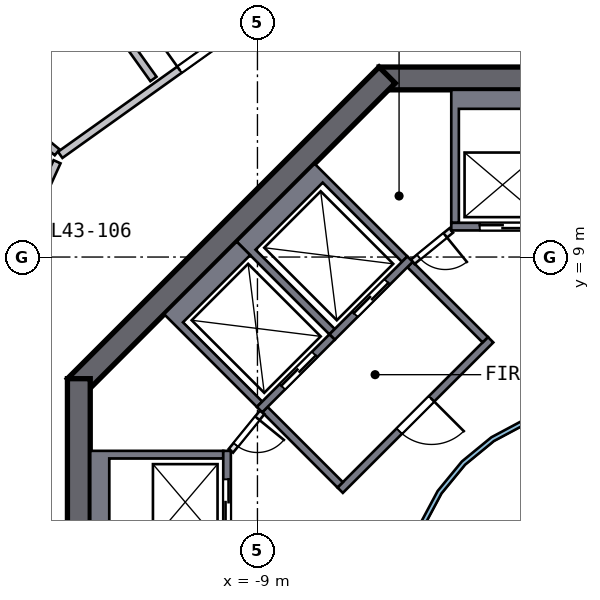
"""IFC4 building model, lengths in metres.
Left out: names, types, materials, properties, quantities, classifications, styles, units other than length and angle.
Written with IfcOpenShell. Run it as: python <this file> out.ifc"""

import sys

from ifc_helpers import new_model, si_unit, direction, frame, frame_2d, origin, place, context, subcontext, project, spatial, polyline, rectangle, outline, extrude, element, fill, save


model = new_model("IFC4")
c1 = context("Model", 3, precision=1e-05, world=origin(), true_north=direction((0.0, 1.0)))
c2 = subcontext(c1, "Body", "Model", "MODEL_VIEW")
j1 = project(units=[si_unit("LENGTHUNIT", "METRE"), si_unit("PLANEANGLEUNIT", "RADIAN")], contexts=[c1])
p1 = place(None, origin())
s1 = spatial("IfcSite", under=j1, at=p1, CompositionType="ELEMENT")
p2 = place(p1, origin())
s2 = spatial("IfcBuilding", under=s1, at=p2, CompositionType="ELEMENT")
p3 = place(p2, frame((0.0, 0.0, 180.0)))
s3 = spatial("IfcBuildingStorey", under=s2, at=p3, CompositionType="ELEMENT", Elevation=180.0)
p4 = place(p3, frame((5.799, 13.7, 0.0), z_axis=(0.0, 0.0, 1.0), x_axis=(-1.0, 0.0, 0.0)))
e1 = element("IfcWall", 1, at=p4, inside=s3, PredefinedType="SHEAR", context=c2, shape_type="SweptSolid", body=[
    extrude(rectangle(XDim=11.598, YDim=0.6, at=frame_2d((5.799, 0.0))), origin(), (0.0, 0.0, 1.0), 3.5),
])
p5 = place(p4, frame((4.899, 0.0, 0.0)))
e2 = element("IfcOpeningElement", 2, at=p5, cuts=e1, PredefinedType="OPENING", context=c2, shape_type="SweptSolid", body=[
    extrude(rectangle(XDim=1.8, YDim=2.1, at=frame_2d((0.9, 1.05))), frame((0.0, 0.31, 0.0), z_axis=(0.0, -1.0, 0.0), x_axis=(1.0, 0.0, 0.0)), (0.0, 0.0, 1.0), 0.62),
])
p6 = place(p3, frame((-5.587, 13.788, 0.0), z_axis=(0.0, 0.0, 1.0), x_axis=(-0.707106781, -0.707106781, 0.0)))
e3 = element("IfcWall", 3, at=p6, inside=s3, PredefinedType="SHEAR", context=c2, shape_type="SweptSolid", body=[
    extrude(rectangle(XDim=11.598, YDim=0.6, at=frame_2d((5.799, 0.0))), origin(), (0.0, 0.0, 1.0), 3.5),
])
p7 = place(p3, frame((-13.7, 5.799, 0.0), z_axis=(0.0, 0.0, 1.0), x_axis=(0.0, -1.0, 0.0)))
e4 = element("IfcWall", 4, at=p7, inside=s3, PredefinedType="SHEAR", context=c2, shape_type="SweptSolid", body=[
    extrude(rectangle(XDim=11.598, YDim=0.6, at=frame_2d((5.799, 0.0))), origin(), (0.0, 0.0, 1.0), 3.5),
])
p8 = place(p7, frame((4.899, 0.0, 0.0)))
e5 = element("IfcOpeningElement", 5, at=p8, cuts=e4, PredefinedType="OPENING", context=c2, shape_type="SweptSolid", body=[
    extrude(rectangle(XDim=1.8, YDim=2.1, at=frame_2d((0.9, 1.05))), frame((0.0, 0.31, 0.0), z_axis=(0.0, -1.0, 0.0), x_axis=(1.0, 0.0, 0.0)), (0.0, 0.0, 1.0), 0.62),
])
p9 = place(p3, origin())
e6 = element("IfcWall", 6, at=p9, inside=s3, PredefinedType="SOLIDWALL", context=c2, shape_type="SweptSolid", body=[
    extrude(outline(polyline([(-3.9, 13.4), (-1.2, 13.4), (-1.2, 9.9), (-1.4, 9.9), (-1.4, 12.9), (-3.7, 12.9), (-3.7, 9.9), (-3.9, 9.9), (-3.9, 13.4)])), origin(), (0.0, 0.0, 1.0), 3.19),
])
p10 = place(p3, frame((-1.2, 9.8, 0.0), z_axis=(0.0, 0.0, 1.0), x_axis=(-1.0, 0.0, 0.0)))
e7 = element("IfcWall", 7, at=p10, inside=s3, PredefinedType="SOLIDWALL", context=c2, shape_type="SweptSolid", body=[
    extrude(rectangle(XDim=2.7, YDim=0.2, at=frame_2d((1.35, 0.0))), origin(), (0.0, 0.0, 1.0), 3.19),
])
p11 = place(p10, frame((0.75, 0.0, 0.0)))
e8 = element("IfcOpeningElement", 8, at=p11, cuts=e7, PredefinedType="OPENING", context=c2, shape_type="SweptSolid", body=[
    extrude(rectangle(XDim=1.2, YDim=2.1, at=frame_2d((0.6, 1.05))), frame((0.0, 0.11, 0.0), z_axis=(0.0, -1.0, 0.0), x_axis=(1.0, 0.0, 0.0)), (0.0, 0.0, 1.0), 0.22),
])
p12 = place(p3, origin())
e9 = element("IfcWall", 9, at=p12, inside=s3, PredefinedType="SOLIDWALL", context=c2, shape_type="SweptSolid", body=[
    extrude(outline(polyline([(-13.4, 3.9), (-9.9, 3.9), (-9.9, 3.7), (-12.9, 3.7), (-12.9, 1.4), (-9.9, 1.4), (-9.9, 1.2), (-13.4, 1.2), (-13.4, 3.9)])), origin(), (0.0, 0.0, 1.0), 3.19),
])
p13 = place(p3, frame((-9.8, 1.2, 0.0), z_axis=(0.0, 0.0, 1.0), x_axis=(0.0, 1.0, 0.0)))
e10 = element("IfcWall", 10, at=p13, inside=s3, PredefinedType="SOLIDWALL", context=c2, shape_type="SweptSolid", body=[
    extrude(rectangle(XDim=2.7, YDim=0.2, at=frame_2d((1.35, 0.0))), origin(), (0.0, 0.0, 1.0), 3.19),
])
p14 = place(p13, frame((0.75, 0.0, 0.0)))
e11 = element("IfcOpeningElement", 11, at=p14, cuts=e10, PredefinedType="OPENING", context=c2, shape_type="SweptSolid", body=[
    extrude(rectangle(XDim=1.2, YDim=2.1, at=frame_2d((0.6, 1.05))), frame((0.0, 0.11, 0.0), z_axis=(0.0, -1.0, 0.0), x_axis=(1.0, 0.0, 0.0)), (0.0, 0.0, 1.0), 0.22),
])
p15 = place(p3, origin())
e12 = element("IfcWall", 12, at=p15, inside=s3, PredefinedType="SOLIDWALL", context=c2, shape_type="SweptSolid", body=[
    extrude(outline(polyline([(-9.546, 9.405), (-7.495, 11.455), (-5.056, 9.016), (-5.197, 8.874), (-7.283, 10.96), (-9.051, 9.192), (-6.965, 7.106), (-7.106, 6.965), (-9.546, 9.405)])), origin(), (0.0, 0.0, 1.0), 3.19),
])
p16 = place(p3, frame((-4.985, 8.945, 0.0), z_axis=(0.0, 0.0, 1.0), x_axis=(-0.707106781, -0.707106781, 0.0)))
e13 = element("IfcWall", 13, at=p16, inside=s3, PredefinedType="SOLIDWALL", context=c2, shape_type="SweptSolid", body=[
    extrude(rectangle(XDim=2.9, YDim=0.2, at=frame_2d((1.45, 0.0))), origin(), (0.0, 0.0, 1.0), 3.19),
])
p17 = place(p16, frame((0.85, 0.0, 0.0)))
e14 = element("IfcOpeningElement", 14, at=p17, cuts=e13, PredefinedType="OPENING", context=c2, shape_type="SweptSolid", body=[
    extrude(rectangle(XDim=1.2, YDim=2.1, at=frame_2d((0.6, 1.05))), frame((0.0, 0.11, 0.0), z_axis=(0.0, -1.0, 0.0), x_axis=(1.0, 0.0, 0.0)), (0.0, 0.0, 1.0), 0.22),
])
p18 = place(p3, origin())
e15 = element("IfcWall", 15, at=p18, inside=s3, PredefinedType="SOLIDWALL", context=c2, shape_type="SweptSolid", body=[
    extrude(outline(polyline([(-11.455, 7.495), (-9.546, 9.405), (-9.192, 9.051), (-10.96, 7.283), (-8.874, 5.197), (-9.016, 5.056), (-11.455, 7.495)])), origin(), (0.0, 0.0, 1.0), 3.19),
])
p19 = place(p3, frame((-7.036, 6.894, 0.0), z_axis=(0.0, 0.0, 1.0), x_axis=(-0.707106781, -0.707106781, 0.0)))
e16 = element("IfcWall", 16, at=p19, inside=s3, PredefinedType="SOLIDWALL", context=c2, shape_type="SweptSolid", body=[
    extrude(rectangle(XDim=2.7, YDim=0.2, at=frame_2d((1.35, 0.0))), origin(), (0.0, 0.0, 1.0), 3.19),
])
p20 = place(p19, frame((0.65, 0.0, 0.0)))
e17 = element("IfcOpeningElement", 17, at=p20, cuts=e16, PredefinedType="OPENING", context=c2, shape_type="SweptSolid", body=[
    extrude(rectangle(XDim=1.2, YDim=2.1, at=frame_2d((0.6, 1.05))), frame((0.0, 0.11, 0.0), z_axis=(0.0, -1.0, 0.0), x_axis=(1.0, 0.0, 0.0)), (0.0, 0.0, 1.0), 0.22),
])
p21 = place(p3, frame((-2.864, 6.823, 0.0), z_axis=(0.0, 0.0, 1.0), x_axis=(-0.707106781, -0.707106781, 0.0)))
e18 = element("IfcWall", 18, at=p21, inside=s3, PredefinedType="SOLIDWALL", context=c2, shape_type="SweptSolid", body=[
    extrude(rectangle(XDim=5.6, YDim=0.2, at=frame_2d((2.8, 0.0))), origin(), (0.0, 0.0, 1.0), 3.19),
])
p22 = place(p21, frame((2.2, 0.0, 0.0)))
e19 = element("IfcOpeningElement", 19, at=p22, cuts=e18, PredefinedType="OPENING", context=c2, shape_type="SweptSolid", body=[
    extrude(rectangle(XDim=1.2, YDim=2.1, at=frame_2d((0.6, 1.05))), frame((0.0, 0.11, 0.0), z_axis=(0.0, -1.0, 0.0), x_axis=(1.0, 0.0, 0.0)), (0.0, 0.0, 1.0), 0.22),
])
for number, where, z_axis, x_axis in (
    (20, (-3.005, 6.823, 0.0), (0.0, 0.0, 1.0), (-0.707, 0.707, 0.0)),
    (21, (-6.823, 3.005, 0.0), (0.0, 0.0, 1.0), (-0.707, 0.707, 0.0)),
):
    element("IfcWall", number, at=place(p3, frame(where, z_axis=z_axis, x_axis=x_axis)), inside=s3, PredefinedType="SOLIDWALL", context=c2, shape_type="SweptSolid", body=[
        extrude(rectangle(XDim=2.8, YDim=0.2, at=frame_2d((1.4, 0.0))), origin(), (0.0, 0.0, 1.0), 3.19),
    ])
p23 = place(p3, frame((-3.9, 9.7, 0.0), z_axis=(0.0, 0.0, 1.0), x_axis=(-0.775559878, -0.631274009, 0.0)))
e22 = element("IfcWall", 22, at=p23, inside=s3, PredefinedType="PARTITIONING", context=c2, shape_type="SweptSolid", body=[
    extrude(rectangle(XDim=1.308, YDim=0.15, at=frame_2d((0.654, 0.0))), origin(), (0.0, 0.0, 1.0), 3.19),
])
p24 = place(p23, frame((0.204, 0.0, 0.0)))
e23 = element("IfcOpeningElement", 23, at=p24, cuts=e22, PredefinedType="OPENING", context=c2, shape_type="SweptSolid", body=[
    extrude(rectangle(XDim=0.9, YDim=2.1, at=frame_2d((0.45, 1.05))), frame((0.0, 0.085, 0.0), z_axis=(0.0, -1.0, 0.0), x_axis=(1.0, 0.0, 0.0)), (0.0, 0.0, 1.0), 0.17),
])
p25 = place(p3, frame((-8.874, 4.914, 0.0), z_axis=(0.0, 0.0, 1.0), x_axis=(-0.631274009, -0.775559878, 0.0)))
e24 = element("IfcWall", 24, at=p25, inside=s3, PredefinedType="PARTITIONING", context=c2, shape_type="SweptSolid", body=[
    extrude(rectangle(XDim=1.308, YDim=0.15, at=frame_2d((0.654, 0.0))), origin(), (0.0, 0.0, 1.0), 3.19),
])
p26 = place(p25, frame((0.204, 0.0, 0.0)))
e25 = element("IfcOpeningElement", 25, at=p26, cuts=e24, PredefinedType="OPENING", context=c2, shape_type="SweptSolid", body=[
    extrude(rectangle(XDim=0.9, YDim=2.1, at=frame_2d((0.45, 1.05))), frame((0.0, 0.085, 0.0), z_axis=(0.0, -1.0, 0.0), x_axis=(1.0, 0.0, 0.0)), (0.0, 0.0, 1.0), 0.17),
])
p27 = place(p3, origin())
e26 = element("IfcWall", 26, at=p27, inside=s3, PredefinedType="SOLIDWALL", context=c2, shape_type="SweptSolid", body=[
    extrude(outline(polyline([(5.021, -0.999), (4.73, -1.959), (4.257, -2.844), (3.62, -3.62), (2.844, -4.257), (1.959, -4.73), (0.999, -5.021), (0.0, -5.12), (-0.999, -5.021), (-1.959, -4.73), (-2.844, -4.257), (-3.62, -3.62), (-4.257, -2.844), (-4.73, -1.959), (-5.021, -0.999), (-5.12, 0.0), (-5.021, 0.999), (-4.73, 1.959), (-4.257, 2.844), (-3.62, 3.62), (-2.844, 4.257), (-1.959, 4.73), (-0.999, 5.021), (0.0, 5.12), (0.999, 5.021), (1.959, 4.73), (2.844, 4.257), (3.62, 3.62), (4.257, 2.844), (4.73, 1.959), (5.021, 0.999), (5.12, 0.0), (5.021, -0.999)]), holes=[polyline([(4.904, 0.976), (4.619, 1.913), (4.157, 2.778), (3.535, 3.535), (2.778, 4.157), (1.913, 4.619), (0.976, 4.904), (0.0, 5.0), (-0.976, 4.904), (-1.913, 4.619), (-2.778, 4.157), (-3.535, 3.535), (-4.157, 2.778), (-4.619, 1.913), (-4.904, 0.976), (-5.0, 0.0), (-4.904, -0.976), (-4.619, -1.913), (-4.157, -2.778), (-3.535, -3.535), (-2.778, -4.157), (-1.913, -4.619), (-0.976, -4.904), (0.0, -5.0), (0.976, -4.904), (1.913, -4.619), (2.778, -4.157), (3.535, -3.535), (4.157, -2.778), (4.619, -1.913), (4.904, -0.976), (5.0, 0.0), (4.904, 0.976)])]), origin(), (0.0, 0.0, 1.0), 3.19),
])
p28 = place(p3, frame((-18.134, 3.028, 0.0), z_axis=(0.0, 0.0, 1.0), x_axis=(0.414381347, 0.910103345, 0.0)))
e27 = element("IfcWall", 27, at=p28, inside=s3, PredefinedType="SOLIDWALL", context=c2, shape_type="SweptSolid", body=[
    extrude(rectangle(XDim=9.317, YDim=0.2, at=frame_2d((4.658, 0.0))), origin(), (0.0, 0.0, 1.0), 3.19),
])
p29 = place(p28, frame((1.9, 0.0, 0.0)))
e28 = element("IfcOpeningElement", 28, at=p29, cuts=e27, PredefinedType="OPENING", context=c2, shape_type="SweptSolid", body=[
    extrude(rectangle(XDim=1.0, YDim=2.1, at=frame_2d((0.5, 1.05))), frame((0.0, 0.11, 0.0), z_axis=(0.0, -1.0, 0.0), x_axis=(1.0, 0.0, 0.0)), (0.0, 0.0, 1.0), 0.22),
])
p30 = place(p3, frame((-14.19, 11.689, 0.0), z_axis=(0.0, 0.0, 1.0), x_axis=(0.813908508, 0.580993065, 0.0)))
e29 = element("IfcWall", 29, at=p30, inside=s3, PredefinedType="SOLIDWALL", context=c2, shape_type="SweptSolid", body=[
    extrude(rectangle(XDim=9.517, YDim=0.2, at=frame_2d((4.758, 0.0))), origin(), (0.0, 0.0, 1.0), 3.19),
])
p31 = place(p30, frame((3.857, 0.0, 0.0)))
e30 = element("IfcOpeningElement", 30, at=p31, cuts=e29, PredefinedType="OPENING", context=c2, shape_type="SweptSolid", body=[
    extrude(rectangle(XDim=1.8, YDim=2.1, at=frame_2d((0.9, 1.05))), frame((0.0, 0.11, 0.0), z_axis=(0.0, -1.0, 0.0), x_axis=(1.0, 0.0, 0.0)), (0.0, 0.0, 1.0), 0.22),
])
p32 = place(p3, frame((-11.737, 13.686, 0.0), z_axis=(0.0, 0.0, 1.0), x_axis=(-0.580992549, 0.813908876, 0.0)))
e31 = element("IfcWall", 31, at=p32, inside=s3, PredefinedType="SOLIDWALL", context=c2, shape_type="SweptSolid", body=[
    extrude(rectangle(XDim=13.916, YDim=0.2, at=frame_2d((6.958, 0.0))), origin(), (0.0, 0.0, 1.0), 3.19),
])
p33 = place(p32, frame((4.3, 0.0, 0.0)))
e32 = element("IfcOpeningElement", 32, at=p33, cuts=e31, PredefinedType="OPENING", context=c2, shape_type="SweptSolid", body=[
    extrude(rectangle(XDim=1.0, YDim=2.1, at=frame_2d((0.5, 1.05))), frame((0.0, 0.11, 0.0), z_axis=(0.0, -1.0, 0.0), x_axis=(1.0, 0.0, 0.0)), (0.0, 0.0, 1.0), 0.22),
])
p34 = place(p3, frame((-14.27, 11.755, 0.0), z_axis=(0.0, 0.0, 1.0), x_axis=(-0.771849833, 0.635804872, 0.0)))
e33 = element("IfcWall", 33, at=p34, inside=s3, PredefinedType="SOLIDWALL", context=c2, shape_type="SweptSolid", body=[
    extrude(rectangle(XDim=3.419, YDim=0.2, at=frame_2d((1.709, 0.0))), origin(), (0.0, 0.0, 1.0), 3.19),
])
p35 = place(p11, origin())
e34 = element("IfcDoor", 34, at=p35, inside=s3, OperationType="DOUBLE_DOOR_SLIDING", PredefinedType="DOOR", context=c2, shape_type="SweptSolid", body=[
    extrude(rectangle(XDim=1.2, YDim=2.1, at=frame_2d((0.6, 1.05))), frame((0.0, 0.025, 0.0), z_axis=(0.0, -1.0, 0.0), x_axis=(1.0, 0.0, 0.0)), (0.0, 0.0, 1.0), 0.05),
])
fill(e8, e34)
p36 = place(p14, origin())
e35 = element("IfcDoor", 35, at=p36, inside=s3, OperationType="DOUBLE_DOOR_SLIDING", PredefinedType="DOOR", context=c2, shape_type="SweptSolid", body=[
    extrude(rectangle(XDim=1.2, YDim=2.1, at=frame_2d((0.6, 1.05))), frame((0.0, 0.025, 0.0), z_axis=(0.0, -1.0, 0.0), x_axis=(1.0, 0.0, 0.0)), (0.0, 0.0, 1.0), 0.05),
])
fill(e11, e35)
p37 = place(p17, origin())
e36 = element("IfcDoor", 36, at=p37, inside=s3, OperationType="DOUBLE_DOOR_SLIDING", PredefinedType="DOOR", context=c2, shape_type="SweptSolid", body=[
    extrude(rectangle(XDim=1.2, YDim=2.1, at=frame_2d((0.6, 1.05))), frame((0.0, 0.025, 0.0), z_axis=(0.0, -1.0, 0.0), x_axis=(1.0, 0.0, 0.0)), (0.0, 0.0, 1.0), 0.05),
])
fill(e14, e36)
p38 = place(p20, origin())
e37 = element("IfcDoor", 37, at=p38, inside=s3, OperationType="DOUBLE_DOOR_SLIDING", PredefinedType="DOOR", context=c2, shape_type="SweptSolid", body=[
    extrude(rectangle(XDim=1.2, YDim=2.1, at=frame_2d((0.6, 1.05))), frame((0.0, 0.025, 0.0), z_axis=(0.0, -1.0, 0.0), x_axis=(1.0, 0.0, 0.0)), (0.0, 0.0, 1.0), 0.05),
])
fill(e17, e37)
p39 = place(p22, origin())
e38 = element("IfcDoor", 38, at=p39, inside=s3, OperationType="SINGLE_SWING_LEFT", PredefinedType="DOOR", context=c2, shape_type="SweptSolid", body=[
    extrude(rectangle(XDim=1.2, YDim=2.1, at=frame_2d((0.6, 1.05))), frame((0.0, 0.025, 0.0), z_axis=(0.0, -1.0, 0.0), x_axis=(1.0, 0.0, 0.0)), (0.0, 0.0, 1.0), 0.05),
])
fill(e19, e38)
p40 = place(p24, origin())
e39 = element("IfcDoor", 39, at=p40, inside=s3, OperationType="SINGLE_SWING_LEFT", PredefinedType="DOOR", context=c2, shape_type="SweptSolid", body=[
    extrude(rectangle(XDim=0.9, YDim=2.1, at=frame_2d((0.45, 1.05))), frame((0.0, 0.025, 0.0), z_axis=(0.0, -1.0, 0.0), x_axis=(1.0, 0.0, 0.0)), (0.0, 0.0, 1.0), 0.05),
])
fill(e23, e39)
p41 = place(p26, origin())
e40 = element("IfcDoor", 40, at=p41, inside=s3, OperationType="SINGLE_SWING_LEFT", PredefinedType="DOOR", context=c2, shape_type="SweptSolid", body=[
    extrude(rectangle(XDim=0.9, YDim=2.1, at=frame_2d((0.45, 1.05))), frame((0.0, 0.025, 0.0), z_axis=(0.0, -1.0, 0.0), x_axis=(1.0, 0.0, 0.0)), (0.0, 0.0, 1.0), 0.05),
])
fill(e25, e40)
p42 = place(p31, origin())
e41 = element("IfcDoor", 41, at=p42, inside=s3, OperationType="DOUBLE_DOOR_SINGLE_SWING", PredefinedType="DOOR", context=c2, shape_type="SweptSolid", body=[
    extrude(rectangle(XDim=1.8, YDim=2.1, at=frame_2d((0.9, 1.05))), frame((0.0, 0.025, 0.0), z_axis=(0.0, -1.0, 0.0), x_axis=(1.0, 0.0, 0.0)), (0.0, 0.0, 1.0), 0.05),
])
fill(e30, e41)
save(model, sys.argv[1])
